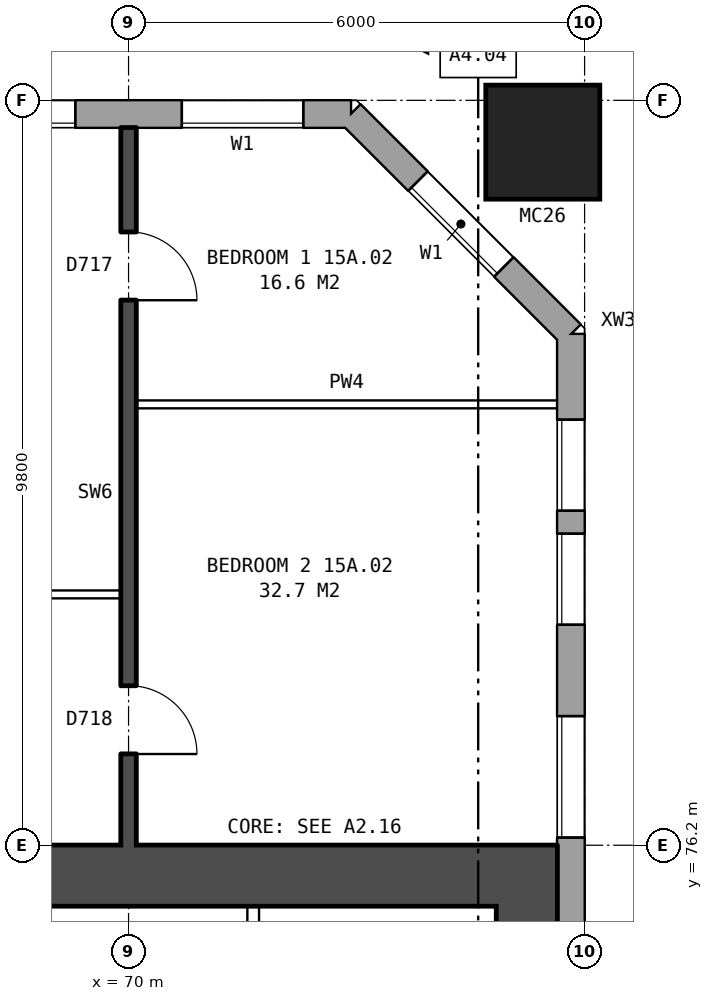
"""IFC4 building model, lengths in metres.
Left out: names, types, materials, properties, quantities, classifications, styles, units other than length and angle.
Written with IfcOpenShell. Run it as: python <this file> out.ifc"""

import sys

from ifc_helpers import new_model, si_unit, direction, frame, frame_2d, origin, origin_2d, place, context, subcontext, project, spatial, rectangle, hollow_rectangle, extrude, element, fill, save


model = new_model("IFC4")
c1 = context("Model", 3, precision=1e-05, world=origin(), true_north=direction((0.0, 1.0)))
c2 = subcontext(c1, "Body", "Model", "MODEL_VIEW")
j1 = project(units=[si_unit("LENGTHUNIT", "METRE"), si_unit("PLANEANGLEUNIT", "RADIAN")], contexts=[c1])
p1 = place(None, origin())
s1 = spatial("IfcSite", under=j1, at=p1, CompositionType="ELEMENT")
p2 = place(p1, origin())
s2 = spatial("IfcBuilding", under=s1, at=p2, CompositionType="ELEMENT")
p3 = place(p2, frame((0.0, 0.0, 56.7)))
s3 = spatial("IfcBuildingStorey", under=s2, at=p3, CompositionType="ELEMENT", Elevation=56.7)
p4 = place(p3, frame((75.45, 85.45, 0.0), z_axis=(0.0, 0.0, 1.0), x_axis=(1.0, 0.0, 0.0)))
e1 = element("IfcColumn", 1, at=p4, inside=s3, PredefinedType="COLUMN", context=c2, shape_type="SweptSolid", body=[
    extrude(hollow_rectangle(XDim=1.5, YDim=1.5, WallThickness=0.08, at=origin_2d()), origin(), (0.0, 0.0, 1.0), 3.1),
])
p5 = place(p3, frame((75.82, 57.075, 0.0), z_axis=(0.0, 0.0, 1.0), x_axis=(0.0, 1.0, 0.0)))
e2 = element("IfcWall", 2, at=p5, inside=s3, PredefinedType="STANDARD", context=c2, shape_type="SweptSolid", body=[
    extrude(rectangle(XDim=25.851, YDim=0.36, at=frame_2d((12.925, 0.0))), origin(), (0.0, 0.0, 1.0), 2.85),
])
p6 = place(p5, frame((1.075, 0.0, 0.8)))
e3 = element("IfcOpeningElement", 3, at=p6, cuts=e2, PredefinedType="OPENING", context=c2, shape_type="SweptSolid", body=[
    extrude(rectangle(XDim=1.2, YDim=1.8, at=frame_2d((0.6, 0.9))), frame((0.0, 0.19, 0.0), z_axis=(0.0, -1.0, 0.0), x_axis=(1.0, 0.0, 0.0)), (0.0, 0.0, 1.0), 0.38),
])
p7 = place(p5, frame((2.575, 0.0, 0.8)))
e4 = element("IfcOpeningElement", 4, at=p7, cuts=e2, PredefinedType="OPENING", context=c2, shape_type="SweptSolid", body=[
    extrude(rectangle(XDim=1.2, YDim=0.9, at=frame_2d((0.6, 0.45))), frame((0.0, 0.19, 0.0), z_axis=(0.0, -1.0, 0.0), x_axis=(1.0, 0.0, 0.0)), (0.0, 0.0, 1.0), 0.38),
])
p8 = place(p5, frame((19.225, 0.0, 1.7)))
e5 = element("IfcOpeningElement", 5, at=p8, cuts=e2, PredefinedType="OPENING", context=c2, shape_type="SweptSolid", body=[
    extrude(rectangle(XDim=1.6, YDim=0.9, at=frame_2d((0.8, 0.45))), frame((0.0, 0.19, 0.0), z_axis=(0.0, -1.0, 0.0), x_axis=(1.0, 0.0, 0.0)), (0.0, 0.0, 1.0), 0.38),
])
p9 = place(p5, frame((22.025, 0.0, 0.8)))
e6 = element("IfcOpeningElement", 6, at=p9, cuts=e2, PredefinedType="OPENING", context=c2, shape_type="SweptSolid", body=[
    extrude(rectangle(XDim=1.2, YDim=0.9, at=frame_2d((0.6, 0.45))), frame((0.0, 0.19, 0.0), z_axis=(0.0, -1.0, 0.0), x_axis=(1.0, 0.0, 0.0)), (0.0, 0.0, 1.0), 0.38),
])
p10 = place(p5, frame((5.025, 0.0, 1.7)))
e7 = element("IfcOpeningElement", 7, at=p10, cuts=e2, PredefinedType="OPENING", context=c2, shape_type="SweptSolid", body=[
    extrude(rectangle(XDim=1.6, YDim=0.9, at=frame_2d((0.8, 0.45))), frame((0.0, 0.19, 0.0), z_axis=(0.0, -1.0, 0.0), x_axis=(1.0, 0.0, 0.0)), (0.0, 0.0, 1.0), 0.38),
])
p11 = place(p5, frame((23.525, 0.0, 0.8)))
e8 = element("IfcOpeningElement", 8, at=p11, cuts=e2, PredefinedType="OPENING", context=c2, shape_type="SweptSolid", body=[
    extrude(rectangle(XDim=1.2, YDim=1.8, at=frame_2d((0.6, 0.9))), frame((0.0, 0.19, 0.0), z_axis=(0.0, -1.0, 0.0), x_axis=(1.0, 0.0, 0.0)), (0.0, 0.0, 1.0), 0.38),
])
p12 = place(p3, frame((75.82, 82.925, 0.0), z_axis=(0.0, 0.0, 1.0), x_axis=(-0.707106781187, 0.707106781187, 0.0)))
e9 = element("IfcWall", 9, at=p12, inside=s3, PredefinedType="STANDARD", context=c2, shape_type="SweptSolid", body=[
    extrude(rectangle(XDim=4.094, YDim=0.36, at=frame_2d((2.047, 0.0))), origin(), (0.0, 0.0, 1.0), 2.85),
])
p13 = place(p12, frame((1.247, 0.0, 0.8)))
e10 = element("IfcOpeningElement", 10, at=p13, cuts=e9, PredefinedType="OPENING", context=c2, shape_type="SweptSolid", body=[
    extrude(rectangle(XDim=1.6, YDim=1.8, at=frame_2d((0.8, 0.9))), frame((0.0, 0.19, 0.0), z_axis=(0.0, -1.0, 0.0), x_axis=(1.0, 0.0, 0.0)), (0.0, 0.0, 1.0), 0.38),
])
p14 = place(p3, frame((72.925, 85.82, 0.0), z_axis=(0.0, 0.0, 1.0), x_axis=(-1.0, 0.0, 0.0)))
e11 = element("IfcWall", 11, at=p14, inside=s3, PredefinedType="STANDARD", context=c2, shape_type="SweptSolid", body=[
    extrude(rectangle(XDim=48.351, YDim=0.36, at=frame_2d((24.175, 0.0))), origin(), (0.0, 0.0, 1.0), 2.85),
])
p15 = place(p14, frame((0.625, 0.0, 0.8)))
e12 = element("IfcOpeningElement", 12, at=p15, cuts=e11, PredefinedType="OPENING", context=c2, shape_type="SweptSolid", body=[
    extrude(rectangle(XDim=1.6, YDim=1.8, at=frame_2d((0.8, 0.9))), frame((0.0, 0.19, 0.0), z_axis=(0.0, -1.0, 0.0), x_axis=(1.0, 0.0, 0.0)), (0.0, 0.0, 1.0), 0.38),
])
p16 = place(p14, frame((3.625, 0.0, 0.8)))
e13 = element("IfcOpeningElement", 13, at=p16, cuts=e11, PredefinedType="OPENING", context=c2, shape_type="SweptSolid", body=[
    extrude(rectangle(XDim=1.6, YDim=1.8, at=frame_2d((0.8, 0.9))), frame((0.0, 0.19, 0.0), z_axis=(0.0, -1.0, 0.0), x_axis=(1.0, 0.0, 0.0)), (0.0, 0.0, 1.0), 0.38),
])
p17 = place(p14, frame((6.625, 0.0, 0.8)))
e14 = element("IfcOpeningElement", 14, at=p17, cuts=e11, PredefinedType="OPENING", context=c2, shape_type="SweptSolid", body=[
    extrude(rectangle(XDim=1.6, YDim=1.8, at=frame_2d((0.8, 0.9))), frame((0.0, 0.19, 0.0), z_axis=(0.0, -1.0, 0.0), x_axis=(1.0, 0.0, 0.0)), (0.0, 0.0, 1.0), 0.38),
])
p18 = place(p14, frame((9.625, 0.0, 0.8)))
e15 = element("IfcOpeningElement", 15, at=p18, cuts=e11, PredefinedType="OPENING", context=c2, shape_type="SweptSolid", body=[
    extrude(rectangle(XDim=1.6, YDim=1.8, at=frame_2d((0.8, 0.9))), frame((0.0, 0.19, 0.0), z_axis=(0.0, -1.0, 0.0), x_axis=(1.0, 0.0, 0.0)), (0.0, 0.0, 1.0), 0.38),
])
p19 = place(p14, frame((12.625, 0.0, 0.8)))
e16 = element("IfcOpeningElement", 16, at=p19, cuts=e11, PredefinedType="OPENING", context=c2, shape_type="SweptSolid", body=[
    extrude(rectangle(XDim=1.6, YDim=1.8, at=frame_2d((0.8, 0.9))), frame((0.0, 0.19, 0.0), z_axis=(0.0, -1.0, 0.0), x_axis=(1.0, 0.0, 0.0)), (0.0, 0.0, 1.0), 0.38),
])
p20 = place(p14, frame((15.125, 0.0, 0.8)))
e17 = element("IfcOpeningElement", 17, at=p20, cuts=e11, PredefinedType="OPENING", context=c2, shape_type="SweptSolid", body=[
    extrude(rectangle(XDim=1.0, YDim=1.8, at=frame_2d((0.5, 0.9))), frame((0.0, 0.19, 0.0), z_axis=(0.0, -1.0, 0.0), x_axis=(1.0, 0.0, 0.0)), (0.0, 0.0, 1.0), 0.38),
])
p21 = place(p14, frame((18.625, 0.0, 0.65)))
e18 = element("IfcOpeningElement", 18, at=p21, cuts=e11, PredefinedType="OPENING", context=c2, shape_type="SweptSolid", body=[
    extrude(rectangle(XDim=0.8, YDim=0.9, at=frame_2d((0.4, 0.45))), frame((0.0, 0.19, 0.0), z_axis=(0.0, -1.0, 0.0), x_axis=(1.0, 0.0, 0.0)), (0.0, 0.0, 1.0), 0.38),
])
p22 = place(p14, frame((21.625, 0.0, 0.8)))
e19 = element("IfcOpeningElement", 19, at=p22, cuts=e11, PredefinedType="OPENING", context=c2, shape_type="SweptSolid", body=[
    extrude(rectangle(XDim=1.6, YDim=1.8, at=frame_2d((0.8, 0.9))), frame((0.0, 0.19, 0.0), z_axis=(0.0, -1.0, 0.0), x_axis=(1.0, 0.0, 0.0)), (0.0, 0.0, 1.0), 0.38),
])
p23 = place(p14, frame((24.625, 0.0, 0.8)))
e20 = element("IfcOpeningElement", 20, at=p23, cuts=e11, PredefinedType="OPENING", context=c2, shape_type="SweptSolid", body=[
    extrude(rectangle(XDim=1.6, YDim=1.8, at=frame_2d((0.8, 0.9))), frame((0.0, 0.19, 0.0), z_axis=(0.0, -1.0, 0.0), x_axis=(1.0, 0.0, 0.0)), (0.0, 0.0, 1.0), 0.38),
])
p24 = place(p14, frame((27.125, 0.0, 0.8)))
e21 = element("IfcOpeningElement", 21, at=p24, cuts=e11, PredefinedType="OPENING", context=c2, shape_type="SweptSolid", body=[
    extrude(rectangle(XDim=1.0, YDim=1.8, at=frame_2d((0.5, 0.9))), frame((0.0, 0.19, 0.0), z_axis=(0.0, -1.0, 0.0), x_axis=(1.0, 0.0, 0.0)), (0.0, 0.0, 1.0), 0.38),
])
p25 = place(p14, frame((28.425, 0.0, 0.8)))
e22 = element("IfcOpeningElement", 22, at=p25, cuts=e11, PredefinedType="OPENING", context=c2, shape_type="SweptSolid", body=[
    extrude(rectangle(XDim=1.0, YDim=0.9, at=frame_2d((0.5, 0.45))), frame((0.0, 0.19, 0.0), z_axis=(0.0, -1.0, 0.0), x_axis=(1.0, 0.0, 0.0)), (0.0, 0.0, 1.0), 0.38),
])
p26 = place(p14, frame((33.625, 0.0, 0.8)))
e23 = element("IfcOpeningElement", 23, at=p26, cuts=e11, PredefinedType="OPENING", context=c2, shape_type="SweptSolid", body=[
    extrude(rectangle(XDim=1.6, YDim=1.8, at=frame_2d((0.8, 0.9))), frame((0.0, 0.19, 0.0), z_axis=(0.0, -1.0, 0.0), x_axis=(1.0, 0.0, 0.0)), (0.0, 0.0, 1.0), 0.38),
])
p27 = place(p14, frame((36.625, 0.0, 0.8)))
e24 = element("IfcOpeningElement", 24, at=p27, cuts=e11, PredefinedType="OPENING", context=c2, shape_type="SweptSolid", body=[
    extrude(rectangle(XDim=1.6, YDim=1.8, at=frame_2d((0.8, 0.9))), frame((0.0, 0.19, 0.0), z_axis=(0.0, -1.0, 0.0), x_axis=(1.0, 0.0, 0.0)), (0.0, 0.0, 1.0), 0.38),
])
p28 = place(p14, frame((39.625, 0.0, 0.8)))
e25 = element("IfcOpeningElement", 25, at=p28, cuts=e11, PredefinedType="OPENING", context=c2, shape_type="SweptSolid", body=[
    extrude(rectangle(XDim=1.6, YDim=1.8, at=frame_2d((0.8, 0.9))), frame((0.0, 0.19, 0.0), z_axis=(0.0, -1.0, 0.0), x_axis=(1.0, 0.0, 0.0)), (0.0, 0.0, 1.0), 0.38),
])
p29 = place(p14, frame((42.625, 0.0, 0.8)))
e26 = element("IfcOpeningElement", 26, at=p29, cuts=e11, PredefinedType="OPENING", context=c2, shape_type="SweptSolid", body=[
    extrude(rectangle(XDim=1.6, YDim=1.8, at=frame_2d((0.8, 0.9))), frame((0.0, 0.19, 0.0), z_axis=(0.0, -1.0, 0.0), x_axis=(1.0, 0.0, 0.0)), (0.0, 0.0, 1.0), 0.38),
])
p30 = place(p14, frame((45.625, 0.0, 0.8)))
e27 = element("IfcOpeningElement", 27, at=p30, cuts=e11, PredefinedType="OPENING", context=c2, shape_type="SweptSolid", body=[
    extrude(rectangle(XDim=1.6, YDim=1.8, at=frame_2d((0.8, 0.9))), frame((0.0, 0.19, 0.0), z_axis=(0.0, -1.0, 0.0), x_axis=(1.0, 0.0, 0.0)), (0.0, 0.0, 1.0), 0.38),
])
p31 = place(p14, frame((16.425, 0.0, 1.7)))
e28 = element("IfcOpeningElement", 28, at=p31, cuts=e11, PredefinedType="OPENING", context=c2, shape_type="SweptSolid", body=[
    extrude(rectangle(XDim=1.0, YDim=0.9, at=frame_2d((0.5, 0.45))), frame((0.0, 0.19, 0.0), z_axis=(0.0, -1.0, 0.0), x_axis=(1.0, 0.0, 0.0)), (0.0, 0.0, 1.0), 0.38),
])
p32 = place(p14, frame((19.725, 0.0, 0.75)))
e29 = element("IfcOpeningElement", 29, at=p32, cuts=e11, PredefinedType="OPENING", context=c2, shape_type="SweptSolid", body=[
    extrude(rectangle(XDim=1.0, YDim=1.5, at=frame_2d((0.5, 0.75))), frame((0.0, 0.19, 0.0), z_axis=(0.0, -1.0, 0.0), x_axis=(1.0, 0.0, 0.0)), (0.0, 0.0, 1.0), 0.38),
])
p33 = place(p14, frame((30.875, 0.0, 1.7)))
e30 = element("IfcOpeningElement", 30, at=p33, cuts=e11, PredefinedType="OPENING", context=c2, shape_type="SweptSolid", body=[
    extrude(rectangle(XDim=0.6, YDim=0.9, at=frame_2d((0.3, 0.45))), frame((0.0, 0.19, 0.0), z_axis=(0.0, -1.0, 0.0), x_axis=(1.0, 0.0, 0.0)), (0.0, 0.0, 1.0), 0.38),
])
p34 = place(p14, frame((31.775, 0.0, 1.1)))
e31 = element("IfcOpeningElement", 31, at=p34, cuts=e11, PredefinedType="OPENING", context=c2, shape_type="SweptSolid", body=[
    extrude(rectangle(XDim=0.8, YDim=1.5, at=frame_2d((0.4, 0.75))), frame((0.0, 0.19, 0.0), z_axis=(0.0, -1.0, 0.0), x_axis=(1.0, 0.0, 0.0)), (0.0, 0.0, 1.0), 0.38),
])
p35 = place(p3, frame((75.24, 64.6, 0.0), z_axis=(0.0, 0.0, 1.0), x_axis=(0.0, 1.0, 0.0)))
e32 = element("IfcWall", 32, at=p35, inside=s3, PredefinedType="SHEAR", context=c2, shape_type="SweptSolid", body=[
    extrude(rectangle(XDim=10.8, YDim=0.8, at=frame_2d((5.4, 0.0))), origin(), (0.0, 0.0, 1.0), 2.85),
])
p36 = place(p3, frame((66.64, 75.8, 0.0), z_axis=(0.0, 0.0, 1.0), x_axis=(1.0, 0.0, 0.0)))
e33 = element("IfcWall", 33, at=p36, inside=s3, PredefinedType="SHEAR", context=c2, shape_type="SweptSolid", body=[
    extrude(rectangle(XDim=9.0, YDim=0.8, at=frame_2d((4.5, 0.0))), origin(), (0.0, 0.0, 1.0), 2.85),
])
p37 = place(p3, frame((71.64, 73.45, 0.0), z_axis=(0.0, 0.0, 1.0), x_axis=(0.0, 1.0, 0.0)))
e34 = element("IfcWall", 34, at=p37, inside=s3, PredefinedType="PARTITIONING", context=c2, shape_type="SweptSolid", body=[
    extrude(rectangle(XDim=1.95, YDim=0.15, at=frame_2d((0.975, 0.0))), origin(), (0.0, 0.0, 1.0), 2.85),
])
p38 = place(p37, frame((0.55, 0.0, 0.0)))
e35 = element("IfcOpeningElement", 35, at=p38, cuts=e34, PredefinedType="OPENING", context=c2, shape_type="SweptSolid", body=[
    extrude(rectangle(XDim=0.85, YDim=2.1, at=frame_2d((0.425, 1.05))), frame((0.0, 0.085, 0.0), z_axis=(0.0, -1.0, 0.0), x_axis=(1.0, 0.0, 0.0)), (0.0, 0.0, 1.0), 0.17),
])
p39 = place(p3, frame((64.1, 79.5, 0.0), z_axis=(0.0, 0.0, 1.0), x_axis=(1.0, 0.0, 0.0)))
e36 = element("IfcWall", 36, at=p39, inside=s3, PredefinedType="PARTITIONING", context=c2, shape_type="SweptSolid", body=[
    extrude(rectangle(XDim=5.8, YDim=0.1, at=frame_2d((2.9, 0.0))), origin(), (0.0, 0.0, 1.0), 2.85),
])
p40 = place(p39, frame((3.6, 0.0, 0.0)))
e37 = element("IfcOpeningElement", 37, at=p40, cuts=e36, PredefinedType="OPENING", context=c2, shape_type="SweptSolid", body=[
    extrude(rectangle(XDim=0.9, YDim=2.1, at=frame_2d((0.45, 1.05))), frame((0.0, 0.06, 0.0), z_axis=(0.0, -1.0, 0.0), x_axis=(1.0, 0.0, 0.0)), (0.0, 0.0, 1.0), 0.12),
])
p41 = place(p39, frame((0.7, 0.0, 0.0)))
e38 = element("IfcOpeningElement", 38, at=p41, cuts=e36, PredefinedType="OPENING", context=c2, shape_type="SweptSolid", body=[
    extrude(rectangle(XDim=0.9, YDim=2.1, at=frame_2d((0.45, 1.05))), frame((0.0, 0.06, 0.0), z_axis=(0.0, -1.0, 0.0), x_axis=(1.0, 0.0, 0.0)), (0.0, 0.0, 1.0), 0.12),
])
p42 = place(p3, frame((70.1, 82.0, 0.0), z_axis=(0.0, 0.0, 1.0), x_axis=(1.0, 0.0, 0.0)))
e39 = element("IfcWall", 39, at=p42, inside=s3, PredefinedType="PARTITIONING", context=c2, shape_type="SweptSolid", body=[
    extrude(rectangle(XDim=5.54, YDim=0.1, at=frame_2d((2.77, 0.0))), origin(), (0.0, 0.0, 1.0), 2.85),
])
p43 = place(p3, frame((70.0, 76.2, 0.0), z_axis=(0.0, 0.0, 1.0), x_axis=(0.0, 1.0, 0.0)))
e40 = element("IfcWall", 40, at=p43, inside=s3, PredefinedType="SOLIDWALL", context=c2, shape_type="SweptSolid", body=[
    extrude(rectangle(XDim=9.44, YDim=0.2, at=frame_2d((4.72, 0.0))), origin(), (0.0, 0.0, 1.0), 2.85),
])
p44 = place(p43, frame((7.17, 0.0, 0.0)))
e41 = element("IfcOpeningElement", 41, at=p44, cuts=e40, PredefinedType="OPENING", context=c2, shape_type="SweptSolid", body=[
    extrude(rectangle(XDim=0.9, YDim=2.1, at=frame_2d((0.45, 1.05))), frame((0.0, 0.11, 0.0), z_axis=(0.0, -1.0, 0.0), x_axis=(1.0, 0.0, 0.0)), (0.0, 0.0, 1.0), 0.22),
])
p45 = place(p43, frame((1.2, 0.0, 0.0)))
e42 = element("IfcOpeningElement", 42, at=p45, cuts=e40, PredefinedType="OPENING", context=c2, shape_type="SweptSolid", body=[
    extrude(rectangle(XDim=0.9, YDim=2.1, at=frame_2d((0.45, 1.05))), frame((0.0, 0.11, 0.0), z_axis=(0.0, -1.0, 0.0), x_axis=(1.0, 0.0, 0.0)), (0.0, 0.0, 1.0), 0.22),
])
p46 = place(p8, origin())
e43 = element("IfcWindow", 43, at=p46, inside=s3, PartitioningType="SINGLE_PANEL", PredefinedType="WINDOW", context=c2, shape_type="SweptSolid", body=[
    extrude(rectangle(XDim=1.6, YDim=0.9, at=frame_2d((0.8, 0.45))), frame((0.0, 0.15, 0.0), z_axis=(0.0, -1.0, 0.0), x_axis=(1.0, 0.0, 0.0)), (0.0, 0.0, 1.0), 0.06),
])
fill(e5, e43)
p47 = place(p9, origin())
e44 = element("IfcWindow", 44, at=p47, inside=s3, PartitioningType="SINGLE_PANEL", PredefinedType="WINDOW", context=c2, shape_type="SweptSolid", body=[
    extrude(rectangle(XDim=1.2, YDim=0.9, at=frame_2d((0.6, 0.45))), frame((0.0, 0.15, 0.0), z_axis=(0.0, -1.0, 0.0), x_axis=(1.0, 0.0, 0.0)), (0.0, 0.0, 1.0), 0.06),
])
fill(e6, e44)
p48 = place(p13, origin())
e45 = element("IfcWindow", 45, at=p48, inside=s3, PartitioningType="SINGLE_PANEL", PredefinedType="WINDOW", context=c2, shape_type="SweptSolid", body=[
    extrude(rectangle(XDim=1.6, YDim=1.8, at=frame_2d((0.8, 0.9))), frame((0.0, 0.15, 0.0), z_axis=(0.0, -1.0, 0.0), x_axis=(1.0, 0.0, 0.0)), (0.0, 0.0, 1.0), 0.06),
])
fill(e10, e45)
p49 = place(p15, origin())
e46 = element("IfcWindow", 46, at=p49, inside=s3, PartitioningType="SINGLE_PANEL", PredefinedType="WINDOW", context=c2, shape_type="SweptSolid", body=[
    extrude(rectangle(XDim=1.6, YDim=1.8, at=frame_2d((0.8, 0.9))), frame((0.0, 0.15, 0.0), z_axis=(0.0, -1.0, 0.0), x_axis=(1.0, 0.0, 0.0)), (0.0, 0.0, 1.0), 0.06),
])
fill(e12, e46)
p50 = place(p16, origin())
e47 = element("IfcWindow", 47, at=p50, inside=s3, PartitioningType="SINGLE_PANEL", PredefinedType="WINDOW", context=c2, shape_type="SweptSolid", body=[
    extrude(rectangle(XDim=1.6, YDim=1.8, at=frame_2d((0.8, 0.9))), frame((0.0, 0.15, 0.0), z_axis=(0.0, -1.0, 0.0), x_axis=(1.0, 0.0, 0.0)), (0.0, 0.0, 1.0), 0.06),
])
fill(e13, e47)
p51 = place(p44, frame((0.9, 0.0, 0.0), z_axis=(0.0, 0.0, 1.0), x_axis=(-1.0, 0.0, 0.0)))
e48 = element("IfcDoor", 48, at=p51, inside=s3, OperationType="SINGLE_SWING_RIGHT", PredefinedType="DOOR", context=c2, shape_type="SweptSolid", body=[
    extrude(rectangle(XDim=0.9, YDim=2.1, at=frame_2d((0.45, 1.05))), frame((0.0, 0.025, 0.0), z_axis=(0.0, -1.0, 0.0), x_axis=(1.0, 0.0, 0.0)), (0.0, 0.0, 1.0), 0.05),
])
fill(e41, e48)
p52 = place(p45, frame((0.9, 0.0, 0.0), z_axis=(0.0, 0.0, 1.0), x_axis=(-1.0, 0.0, 0.0)))
e49 = element("IfcDoor", 49, at=p52, inside=s3, OperationType="SINGLE_SWING_RIGHT", PredefinedType="DOOR", context=c2, shape_type="SweptSolid", body=[
    extrude(rectangle(XDim=0.9, YDim=2.1, at=frame_2d((0.45, 1.05))), frame((0.0, 0.025, 0.0), z_axis=(0.0, -1.0, 0.0), x_axis=(1.0, 0.0, 0.0)), (0.0, 0.0, 1.0), 0.05),
])
fill(e42, e49)
p53 = place(p11, origin())
e50 = element("IfcWindow", 50, at=p53, inside=s3, PartitioningType="SINGLE_PANEL", PredefinedType="WINDOW", context=c2, shape_type="SweptSolid", body=[
    extrude(rectangle(XDim=1.2, YDim=1.8, at=frame_2d((0.6, 0.9))), frame((0.0, 0.15, 0.0), z_axis=(0.0, -1.0, 0.0), x_axis=(1.0, 0.0, 0.0)), (0.0, 0.0, 1.0), 0.06),
])
fill(e8, e50)
save(model, sys.argv[1])
